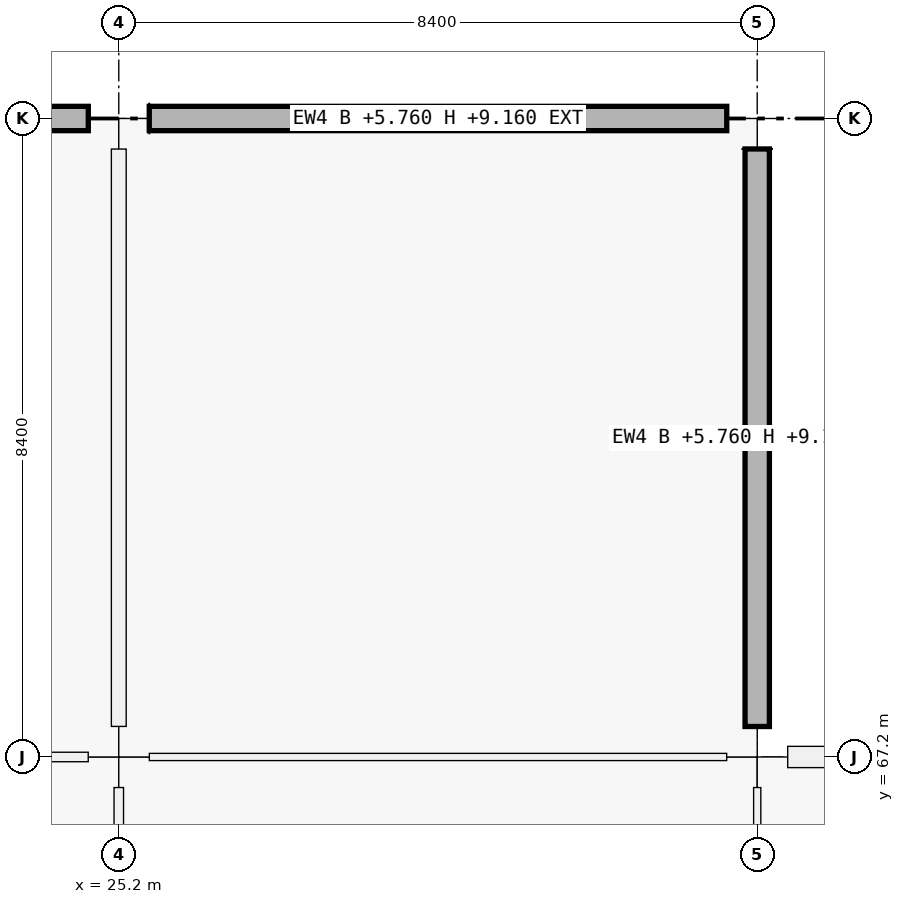
"""IFC4 building model, lengths in metres.
Left out: names, types, materials, properties, quantities, classifications, styles, units other than length and angle.
Written with IfcOpenShell. Run it as: python <this file> out.ifc"""

import sys

from ifc_helpers import new_model, si_unit, direction, frame, frame_2d, origin, origin_2d, place, context, subcontext, project, spatial, rectangle, extrude, element, fill, save


model = new_model("IFC4")
c1 = context("Model", 3, precision=1e-05, world=origin(), true_north=direction((0.0, 1.0)))
c2 = subcontext(c1, "Body", "Model", "MODEL_VIEW")
j1 = project(units=[si_unit("LENGTHUNIT", "METRE"), si_unit("PLANEANGLEUNIT", "RADIAN")], contexts=[c1])
p1 = place(None, origin())
s1 = spatial("IfcSite", under=j1, at=p1, CompositionType="ELEMENT")
p2 = place(p1, origin())
s2 = spatial("IfcBuilding", under=s1, at=p2, CompositionType="ELEMENT")
p3 = place(p2, frame((0.0, 0.0, 5.76)))
s3 = spatial("IfcBuildingStorey", under=s2, at=p3, CompositionType="ELEMENT", Elevation=5.76)
for number, where, z_axis, x_axis in (
    (1, (25.2, 67.2, 0.0), (0.0, 0.0, 1.0), (1.0, 0.0, 0.0)),
    (2, (25.2, 75.6, 0.0), (0.0, 0.0, 1.0), (1.0, 0.0, 0.0)),
    (3, (33.6, 67.2, 0.0), (0.0, 0.0, 1.0), (1.0, 0.0, 0.0)),
    (4, (33.6, 75.6, 0.0), (0.0, 0.0, 1.0), (1.0, 0.0, 0.0)),
):
    element("IfcColumn", number, at=place(p3, frame(where, z_axis=z_axis, x_axis=x_axis)), inside=s3, PredefinedType="COLUMN", context=c2, shape_type="SweptSolid", body=[
        extrude(rectangle(XDim=0.8, YDim=0.8, at=origin_2d()), origin(), (0.0, 0.0, 1.0), 4.5),
    ])
p4 = place(p3, frame((17.201, 75.6, 0.0), z_axis=(0.0, 0.0, 1.0), x_axis=(1.0, 0.0, 0.0)))
e5 = element("IfcWall", 5, at=p4, inside=s3, PredefinedType="SOLIDWALL", context=c2, shape_type="SweptSolid", body=[
    extrude(rectangle(XDim=7.598, YDim=0.32, at=frame_2d((3.799, 0.0))), origin(), (0.0, 0.0, 1.0), 3.4),
])
p5 = place(p4, frame((3.049, 0.0, 0.9)))
e6 = element("IfcOpeningElement", 6, at=p5, cuts=e5, PredefinedType="OPENING", context=c2, shape_type="SweptSolid", body=[
    extrude(rectangle(XDim=1.5, YDim=1.2, at=frame_2d((0.75, 0.6))), frame((0.0, 0.16, 0.0), z_axis=(0.0, -1.0, 0.0), x_axis=(1.0, 0.0, 0.0)), (0.0, 0.0, 1.0), 0.32),
])
p6 = place(p3, frame((25.601, 75.6, 0.0), z_axis=(0.0, 0.0, 1.0), x_axis=(1.0, 0.0, 0.0)))
e7 = element("IfcWall", 7, at=p6, inside=s3, PredefinedType="SOLIDWALL", context=c2, shape_type="SweptSolid", body=[
    extrude(rectangle(XDim=7.598, YDim=0.32, at=frame_2d((3.799, 0.0))), origin(), (0.0, 0.0, 1.0), 3.4),
])
p7 = place(p6, frame((2.724, 0.0, 0.9)))
e8 = element("IfcOpeningElement", 8, at=p7, cuts=e7, PredefinedType="OPENING", context=c2, shape_type="SweptSolid", body=[
    extrude(rectangle(XDim=2.15, YDim=1.95, at=frame_2d((1.075, 0.975))), frame((0.0, 0.16, 0.0), z_axis=(0.0, -1.0, 0.0), x_axis=(1.0, 0.0, 0.0)), (0.0, 0.0, 1.0), 0.32),
])
p8 = place(p3, frame((33.6, 75.199, 0.0), z_axis=(0.0, 0.0, 1.0), x_axis=(0.0, -1.0, 0.0)))
e9 = element("IfcWall", 9, at=p8, inside=s3, PredefinedType="SOLIDWALL", context=c2, shape_type="SweptSolid", body=[
    extrude(rectangle(XDim=7.598, YDim=0.32, at=frame_2d((3.799, 0.0))), origin(), (0.0, 0.0, 1.0), 3.4),
])
p9 = place(p8, frame((2.524, 0.0, 0.9)))
e10 = element("IfcOpeningElement", 10, at=p9, cuts=e9, PredefinedType="OPENING", context=c2, shape_type="SweptSolid", body=[
    extrude(rectangle(XDim=2.55, YDim=1.95, at=frame_2d((1.275, 0.975))), frame((0.0, 0.16, 0.0), z_axis=(0.0, -1.0, 0.0), x_axis=(1.0, 0.0, 0.0)), (0.0, 0.0, 1.0), 0.32),
])
p10 = place(p3, frame((34.001, 67.2, 0.0), z_axis=(0.0, 0.0, 1.0), x_axis=(1.0, 0.0, 0.0)))
e11 = element("IfcWall", 11, at=p10, inside=s3, PredefinedType="SOLIDWALL", context=c2, shape_type="SweptSolid", body=[
    extrude(rectangle(XDim=7.598, YDim=0.28, at=frame_2d((3.799, 0.0))), origin(), (0.0, 0.0, 1.0), 3.4),
])
p11 = place(p10, frame((3.149, 0.0, 0.9)))
e12 = element("IfcOpeningElement", 12, at=p11, cuts=e11, PredefinedType="OPENING", context=c2, shape_type="SweptSolid", body=[
    extrude(rectangle(XDim=1.3, YDim=1.95, at=frame_2d((0.65, 0.975))), frame((0.0, 0.14, 0.0), z_axis=(0.0, -1.0, 0.0), x_axis=(1.0, 0.0, 0.0)), (0.0, 0.0, 1.0), 0.28),
])
p12 = place(p3, frame((17.202, 67.2, 0.0), z_axis=(0.0, 0.0, 1.0), x_axis=(1.0, 0.0, 0.0)))
e13 = element("IfcWall", 13, at=p12, inside=s3, PredefinedType="PARTITIONING", context=c2, shape_type="SweptSolid", body=[
    extrude(rectangle(XDim=7.596, YDim=0.125, at=frame_2d((3.798, 0.0))), origin(), (0.0, 0.0, 1.0), 2.4),
])
p13 = place(p12, frame((3.273, 0.0, 0.0)))
e14 = element("IfcOpeningElement", 14, at=p13, cuts=e13, PredefinedType="OPENING", context=c2, shape_type="SweptSolid", body=[
    extrude(rectangle(XDim=1.05, YDim=2.12, at=frame_2d((0.525, 1.06))), frame((0.0, 0.062, 0.0), z_axis=(0.0, -1.0, 0.0), x_axis=(1.0, 0.0, 0.0)), (0.0, 0.0, 1.0), 0.125),
])
p14 = place(p3, frame((25.602, 67.2, 0.0), z_axis=(0.0, 0.0, 1.0), x_axis=(1.0, 0.0, 0.0)))
e15 = element("IfcWall", 15, at=p14, inside=s3, PredefinedType="PARTITIONING", context=c2, shape_type="SweptSolid", body=[
    extrude(rectangle(XDim=7.596, YDim=0.095, at=frame_2d((3.798, 0.0))), origin(), (0.0, 0.0, 1.0), 2.4),
])
p15 = place(p14, frame((3.258, 0.0, 0.0)))
e16 = element("IfcOpeningElement", 16, at=p15, cuts=e15, PredefinedType="OPENING", context=c2, shape_type="SweptSolid", body=[
    extrude(rectangle(XDim=1.08, YDim=2.22, at=frame_2d((0.54, 1.11))), frame((0.0, 0.047, 0.0), z_axis=(0.0, -1.0, 0.0), x_axis=(1.0, 0.0, 0.0)), (0.0, 0.0, 1.0), 0.095),
])
p16 = place(p3, frame((25.2, 59.202, 0.0), z_axis=(0.0, 0.0, 1.0), x_axis=(0.0, 1.0, 0.0)))
e17 = element("IfcWall", 17, at=p16, inside=s3, PredefinedType="PARTITIONING", context=c2, shape_type="SweptSolid", body=[
    extrude(rectangle(XDim=7.596, YDim=0.125, at=frame_2d((3.798, 0.0))), origin(), (0.0, 0.0, 1.0), 2.4),
])
p17 = place(p16, frame((3.298, 0.0, 0.0)))
e18 = element("IfcOpeningElement", 18, at=p17, cuts=e17, PredefinedType="OPENING", context=c2, shape_type="SweptSolid", body=[
    extrude(rectangle(XDim=1.0, YDim=2.2, at=frame_2d((0.5, 1.1))), frame((0.0, 0.062, 0.0), z_axis=(0.0, -1.0, 0.0), x_axis=(1.0, 0.0, 0.0)), (0.0, 0.0, 1.0), 0.125),
])
p18 = place(p3, frame((25.2, 67.602, 0.0), z_axis=(0.0, 0.0, 1.0), x_axis=(0.0, 1.0, 0.0)))
e19 = element("IfcWall", 19, at=p18, inside=s3, PredefinedType="PARTITIONING", context=c2, shape_type="SweptSolid", body=[
    extrude(rectangle(XDim=7.596, YDim=0.195, at=frame_2d((3.798, 0.0))), origin(), (0.0, 0.0, 1.0), 2.4),
])
p19 = place(p18, frame((3.288, 0.0, 0.0)))
e20 = element("IfcOpeningElement", 20, at=p19, cuts=e19, PredefinedType="OPENING", context=c2, shape_type="SweptSolid", body=[
    extrude(rectangle(XDim=1.02, YDim=2.2, at=frame_2d((0.51, 1.1))), frame((0.0, 0.098, 0.0), z_axis=(0.0, -1.0, 0.0), x_axis=(1.0, 0.0, 0.0)), (0.0, 0.0, 1.0), 0.195),
])
p20 = place(p3, frame((33.6, 59.202, 0.0), z_axis=(0.0, 0.0, 1.0), x_axis=(0.0, 1.0, 0.0)))
e21 = element("IfcWall", 21, at=p20, inside=s3, PredefinedType="PARTITIONING", context=c2, shape_type="SweptSolid", body=[
    extrude(rectangle(XDim=7.596, YDim=0.095, at=frame_2d((3.798, 0.0))), origin(), (0.0, 0.0, 1.0), 2.4),
])
p21 = place(p20, frame((3.308, 0.0, 0.0)))
e22 = element("IfcOpeningElement", 22, at=p21, cuts=e21, PredefinedType="OPENING", context=c2, shape_type="SweptSolid", body=[
    extrude(rectangle(XDim=0.98, YDim=2.18, at=frame_2d((0.49, 1.09))), frame((0.0, 0.047, 0.0), z_axis=(0.0, -1.0, 0.0), x_axis=(1.0, 0.0, 0.0)), (0.0, 0.0, 1.0), 0.095),
])
p22 = place(p7, origin())
e23 = element("IfcWindow", 23, at=p22, inside=s3, PartitioningType="SINGLE_PANEL", PredefinedType="WINDOW", context=c2, shape_type="SweptSolid", body=[
    extrude(rectangle(XDim=2.15, YDim=1.95, at=frame_2d((1.075, 0.975))), frame((0.0, 0.03, 0.0), z_axis=(0.0, -1.0, 0.0), x_axis=(1.0, 0.0, 0.0)), (0.0, 0.0, 1.0), 0.06),
])
fill(e8, e23)
p23 = place(p9, origin())
e24 = element("IfcWindow", 24, at=p23, inside=s3, PartitioningType="SINGLE_PANEL", PredefinedType="WINDOW", context=c2, shape_type="SweptSolid", body=[
    extrude(rectangle(XDim=2.55, YDim=1.95, at=frame_2d((1.275, 0.975))), frame((0.0, 0.03, 0.0), z_axis=(0.0, -1.0, 0.0), x_axis=(1.0, 0.0, 0.0)), (0.0, 0.0, 1.0), 0.06),
])
fill(e10, e24)
p24 = place(p15, origin())
e25 = element("IfcDoor", 25, at=p24, inside=s3, OperationType="SINGLE_SWING_RIGHT", PredefinedType="DOOR", context=c2, shape_type="SweptSolid", body=[
    extrude(rectangle(XDim=1.08, YDim=2.22, at=frame_2d((0.54, 1.11))), frame((0.0, 0.025, 0.0), z_axis=(0.0, -1.0, 0.0), x_axis=(1.0, 0.0, 0.0)), (0.0, 0.0, 1.0), 0.05),
])
fill(e16, e25)
p25 = place(p19, origin())
e26 = element("IfcDoor", 26, at=p25, inside=s3, OperationType="SINGLE_SWING_LEFT", PredefinedType="DOOR", context=c2, shape_type="SweptSolid", body=[
    extrude(rectangle(XDim=1.02, YDim=2.2, at=frame_2d((0.51, 1.1))), frame((0.0, 0.025, 0.0), z_axis=(0.0, -1.0, 0.0), x_axis=(1.0, 0.0, 0.0)), (0.0, 0.0, 1.0), 0.05),
])
fill(e20, e26)
save(model, sys.argv[1])
